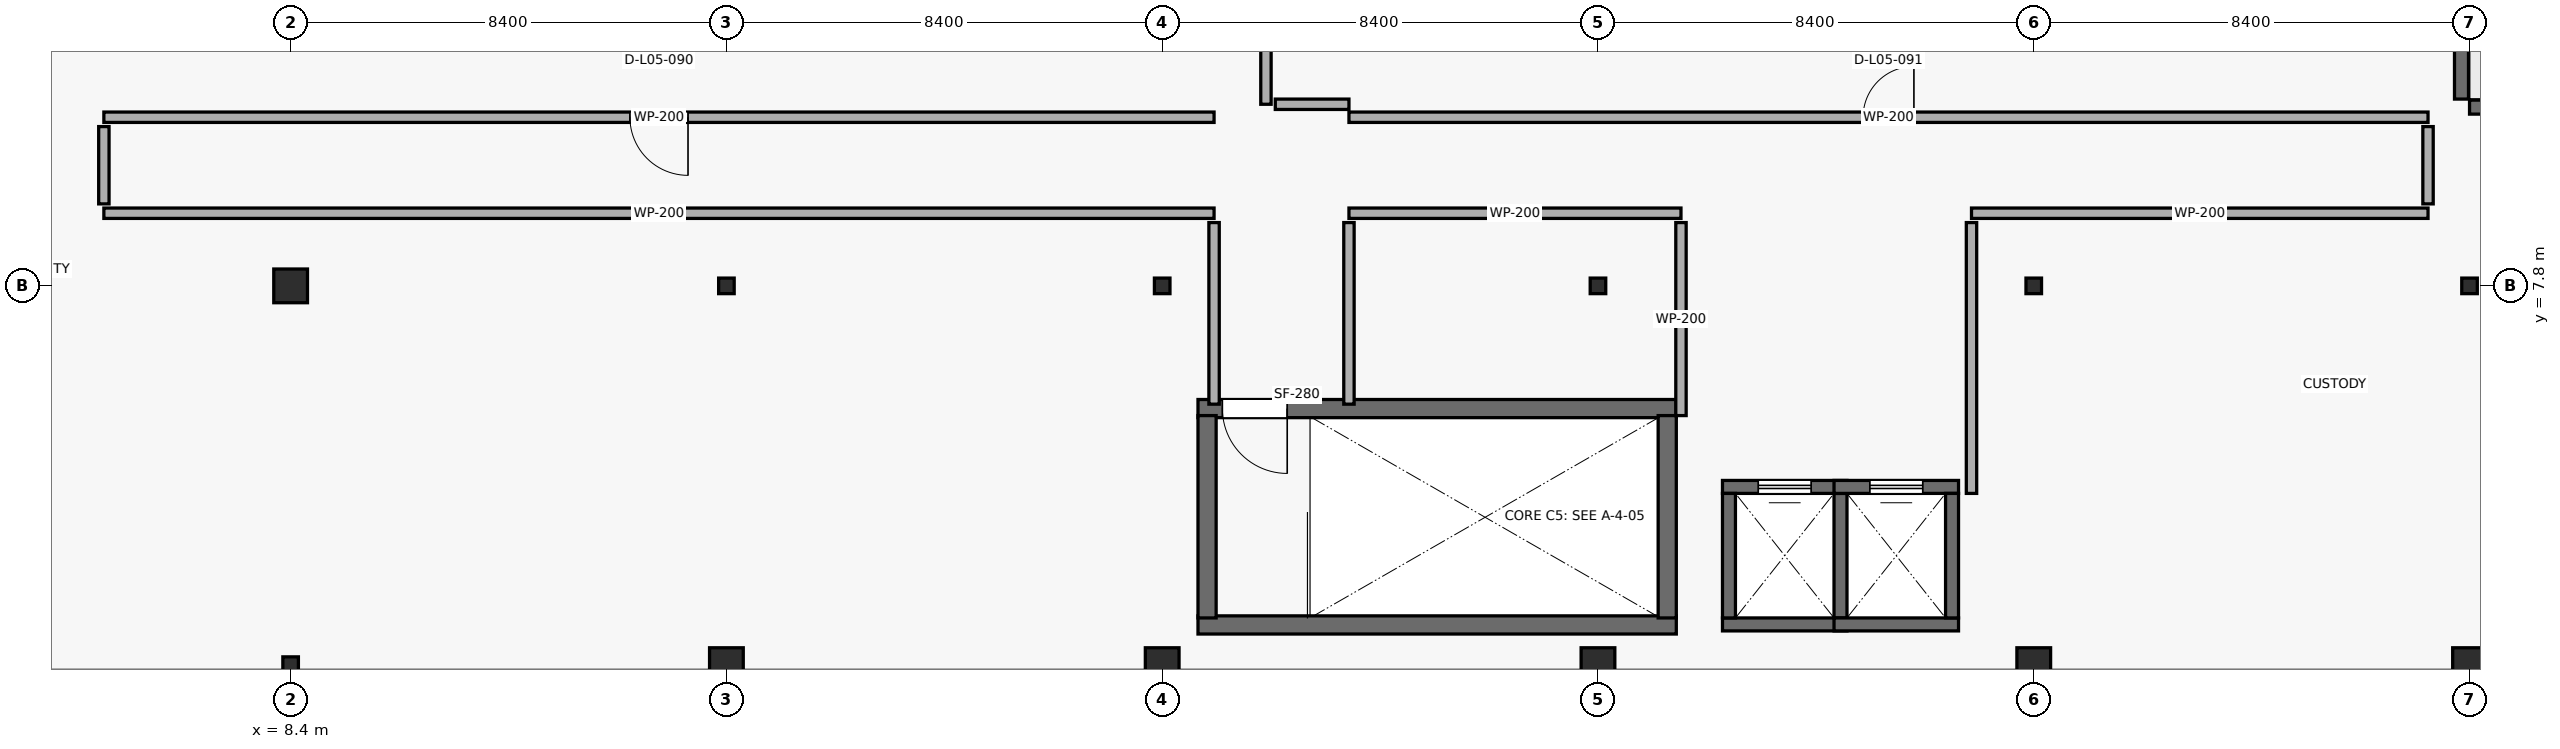
"""IFC4 building model, lengths in metres.
Left out: names, types, materials, properties, quantities, classifications, styles, units other than length and angle.
Written with IfcOpenShell. Run it as: python <this file> out.ifc"""

import sys

from ifc_helpers import new_model, si_unit, direction, frame, frame_2d, origin, origin_2d, place, context, subcontext, project, spatial, rectangle, hollow_rectangle, extrude, element, fill, save


model = new_model("IFC4")
c1 = context("Model", 3, precision=1e-05, world=origin(), true_north=direction((0.0, 1.0)))
c2 = subcontext(c1, "Body", "Model", "MODEL_VIEW")
j1 = project(units=[si_unit("LENGTHUNIT", "METRE"), si_unit("PLANEANGLEUNIT", "RADIAN")], contexts=[c1])
p1 = place(None, origin())
s1 = spatial("IfcSite", under=j1, at=p1, CompositionType="ELEMENT")
p2 = place(p1, origin())
s2 = spatial("IfcBuilding", under=s1, at=p2, CompositionType="ELEMENT")
p3 = place(p2, frame((0.0, 0.0, 20.4)))
s3 = spatial("IfcBuildingStorey", under=s2, at=p3, CompositionType="ELEMENT", Elevation=20.4)
p4 = place(p3, frame((8.4, 0.5, 0.0), z_axis=(0.0, 0.0, 1.0), x_axis=(1.0, 0.0, 0.0)))
e1 = element("IfcColumn", 1, at=p4, inside=s3, PredefinedType="COLUMN", context=c2, shape_type="SweptSolid", body=[
    extrude(hollow_rectangle(XDim=0.3, YDim=0.3, WallThickness=0.012, at=origin_2d()), origin(), (0.0, 0.0, 1.0), 5.1),
])
for number, where, z_axis, x_axis in (
    (2, (8.4, 7.8, 0.0), (0.0, 0.0, 1.0), (1.0, 0.0, 0.0)),
    (3, (16.8, 0.5, 0.0), (0.0, 0.0, 1.0), (1.0, 0.0, 0.0)),
):
    element("IfcColumn", number, at=place(p3, frame(where, z_axis=z_axis, x_axis=x_axis)), inside=s3, PredefinedType="COLUMN", context=c2, shape_type="SweptSolid", body=[
        extrude(rectangle(XDim=0.65, YDim=0.65, at=origin_2d()), origin(), (0.0, 0.0, 1.0), 5.1),
    ])
p5 = place(p3, frame((16.8, 7.8, 0.0), z_axis=(0.0, 0.0, 1.0), x_axis=(1.0, 0.0, 0.0)))
e4 = element("IfcColumn", 4, at=p5, inside=s3, PredefinedType="COLUMN", context=c2, shape_type="SweptSolid", body=[
    extrude(hollow_rectangle(XDim=0.3, YDim=0.3, WallThickness=0.012, at=origin_2d()), origin(), (0.0, 0.0, 1.0), 5.1),
])
p6 = place(p3, frame((25.2, 0.5, 0.0), z_axis=(0.0, 0.0, 1.0), x_axis=(1.0, 0.0, 0.0)))
e5 = element("IfcColumn", 5, at=p6, inside=s3, PredefinedType="COLUMN", context=c2, shape_type="SweptSolid", body=[
    extrude(rectangle(XDim=0.65, YDim=0.65, at=origin_2d()), origin(), (0.0, 0.0, 1.0), 5.1),
])
p7 = place(p3, frame((25.2, 7.8, 0.0), z_axis=(0.0, 0.0, 1.0), x_axis=(1.0, 0.0, 0.0)))
e6 = element("IfcColumn", 6, at=p7, inside=s3, PredefinedType="COLUMN", context=c2, shape_type="SweptSolid", body=[
    extrude(hollow_rectangle(XDim=0.3, YDim=0.3, WallThickness=0.012, at=origin_2d()), origin(), (0.0, 0.0, 1.0), 5.1),
])
p8 = place(p3, frame((33.6, 0.5, 0.0), z_axis=(0.0, 0.0, 1.0), x_axis=(1.0, 0.0, 0.0)))
e7 = element("IfcColumn", 7, at=p8, inside=s3, PredefinedType="COLUMN", context=c2, shape_type="SweptSolid", body=[
    extrude(rectangle(XDim=0.65, YDim=0.65, at=origin_2d()), origin(), (0.0, 0.0, 1.0), 5.1),
])
p9 = place(p3, frame((33.6, 7.8, 0.0), z_axis=(0.0, 0.0, 1.0), x_axis=(1.0, 0.0, 0.0)))
e8 = element("IfcColumn", 8, at=p9, inside=s3, PredefinedType="COLUMN", context=c2, shape_type="SweptSolid", body=[
    extrude(hollow_rectangle(XDim=0.3, YDim=0.3, WallThickness=0.012, at=origin_2d()), origin(), (0.0, 0.0, 1.0), 5.1),
])
p10 = place(p3, frame((42.0, 0.5, 0.0), z_axis=(0.0, 0.0, 1.0), x_axis=(1.0, 0.0, 0.0)))
e9 = element("IfcColumn", 9, at=p10, inside=s3, PredefinedType="COLUMN", context=c2, shape_type="SweptSolid", body=[
    extrude(rectangle(XDim=0.65, YDim=0.65, at=origin_2d()), origin(), (0.0, 0.0, 1.0), 5.1),
])
p11 = place(p3, frame((42.0, 7.8, 0.0), z_axis=(0.0, 0.0, 1.0), x_axis=(1.0, 0.0, 0.0)))
e10 = element("IfcColumn", 10, at=p11, inside=s3, PredefinedType="COLUMN", context=c2, shape_type="SweptSolid", body=[
    extrude(hollow_rectangle(XDim=0.3, YDim=0.3, WallThickness=0.012, at=origin_2d()), origin(), (0.0, 0.0, 1.0), 5.1),
])
p12 = place(p3, frame((50.4, 0.5, 0.0), z_axis=(0.0, 0.0, 1.0), x_axis=(1.0, 0.0, 0.0)))
e11 = element("IfcColumn", 11, at=p12, inside=s3, PredefinedType="COLUMN", context=c2, shape_type="SweptSolid", body=[
    extrude(rectangle(XDim=0.65, YDim=0.65, at=origin_2d()), origin(), (0.0, 0.0, 1.0), 5.1),
])
p13 = place(p3, frame((50.4, 7.8, 0.0), z_axis=(0.0, 0.0, 1.0), x_axis=(1.0, 0.0, 0.0)))
e12 = element("IfcColumn", 12, at=p13, inside=s3, PredefinedType="COLUMN", context=c2, shape_type="SweptSolid", body=[
    extrude(hollow_rectangle(XDim=0.3, YDim=0.3, WallThickness=0.012, at=origin_2d()), origin(), (0.0, 0.0, 1.0), 5.1),
])
p14 = place(p3, frame((50.245, 15.6, 0.0), z_axis=(0.0, 0.0, 1.0), x_axis=(0.0, -1.0, 0.0)))
e13 = element("IfcWall", 13, at=p14, inside=s3, PredefinedType="SOLIDWALL", context=c2, shape_type="SweptSolid", body=[
    extrude(rectangle(XDim=4.2, YDim=0.27, at=frame_2d((2.1, 0.0))), origin(), (0.0, 0.0, 1.0), 4.88),
])
p15 = place(p3, frame((50.4, 11.245, 0.0), z_axis=(0.0, 0.0, 1.0), x_axis=(1.0, 0.0, 0.0)))
e14 = element("IfcWall", 14, at=p15, inside=s3, PredefinedType="SOLIDWALL", context=c2, shape_type="SweptSolid", body=[
    extrude(rectangle(XDim=8.4, YDim=0.27, at=frame_2d((4.2, 0.0))), origin(), (0.0, 0.0, 1.0), 4.88),
])
p16 = place(p15, frame((2.8, 0.0, 1.85)))
e15 = element("IfcOpeningElement", 15, at=p16, cuts=e14, PredefinedType="OPENING", context=c2, shape_type="SweptSolid", body=[
    extrude(rectangle(XDim=0.45, YDim=1.1, at=frame_2d((0.225, 0.55))), frame((0.0, 0.145, 0.0), z_axis=(0.0, -1.0, 0.0), x_axis=(1.0, 0.0, 0.0)), (0.0, 0.0, 1.0), 0.29),
])
p17 = place(p3, frame((25.89, 1.265, 0.0), z_axis=(0.0, 0.0, 1.0), x_axis=(1.0, 0.0, 0.0)))
e16 = element("IfcWall", 16, at=p17, inside=s3, PredefinedType="SHEAR", context=c2, shape_type="SweptSolid", body=[
    extrude(rectangle(XDim=9.22, YDim=0.35, at=frame_2d((4.61, 0.0))), origin(), (0.0, 0.0, 1.0), 4.84),
])
p18 = place(p3, frame((35.11, 5.435, 0.0), z_axis=(0.0, 0.0, 1.0), x_axis=(-1.0, 0.0, 0.0)))
e17 = element("IfcWall", 17, at=p18, inside=s3, PredefinedType="SHEAR", context=c2, shape_type="SweptSolid", body=[
    extrude(rectangle(XDim=9.22, YDim=0.35, at=frame_2d((4.61, 0.0))), origin(), (0.0, 0.0, 1.0), 4.84),
])
p19 = place(p18, frame((7.5, 0.0, 0.0)))
e18 = element("IfcOpeningElement", 18, at=p19, cuts=e17, PredefinedType="OPENING", context=c2, shape_type="SweptSolid", body=[
    extrude(rectangle(XDim=1.25, YDim=2.2, at=frame_2d((0.625, 1.1))), frame((0.0, 0.185, 0.0), z_axis=(0.0, -1.0, 0.0), x_axis=(1.0, 0.0, 0.0)), (0.0, 0.0, 1.0), 0.37),
])
for number, where, z_axis, x_axis in (
    (19, (26.065, 1.4, 0.0), (0.0, 0.0, 1.0), (0.0, 1.0, 0.0)),
    (20, (34.935, 5.3, 0.0), (0.0, 0.0, 1.0), (0.0, -1.0, 0.0)),
):
    element("IfcWall", number, at=place(p3, frame(where, z_axis=z_axis, x_axis=x_axis)), inside=s3, PredefinedType="SHEAR", context=c2, shape_type="SweptSolid", body=[
        extrude(rectangle(XDim=3.9, YDim=0.35, at=frame_2d((1.95, 0.0))), origin(), (0.0, 0.0, 1.0), 4.84),
    ])
p20 = place(p3, frame((36.0, 1.275, 0.0), z_axis=(0.0, 0.0, 1.0), x_axis=(1.0, 0.0, 0.0)))
e21 = element("IfcWall", 21, at=p20, inside=s3, PredefinedType="SHEAR", context=c2, shape_type="SweptSolid", body=[
    extrude(rectangle(XDim=2.4, YDim=0.25, at=frame_2d((1.2, 0.0))), origin(), (0.0, 0.0, 1.0), 4.84),
])
p21 = place(p3, frame((38.4, 3.925, 0.0), z_axis=(0.0, 0.0, 1.0), x_axis=(-1.0, 0.0, 0.0)))
e22 = element("IfcWall", 22, at=p21, inside=s3, PredefinedType="SHEAR", context=c2, shape_type="SweptSolid", body=[
    extrude(rectangle(XDim=2.4, YDim=0.25, at=frame_2d((1.2, 0.0))), origin(), (0.0, 0.0, 1.0), 4.84),
])
p22 = place(p21, frame((0.69, 0.0, 0.0)))
e23 = element("IfcOpeningElement", 23, at=p22, cuts=e22, PredefinedType="OPENING", context=c2, shape_type="SweptSolid", body=[
    extrude(rectangle(XDim=1.02, YDim=2.15, at=frame_2d((0.51, 1.075))), frame((0.0, 0.135, 0.0), z_axis=(0.0, -1.0, 0.0), x_axis=(1.0, 0.0, 0.0)), (0.0, 0.0, 1.0), 0.27),
])
for number, where, z_axis, x_axis in (
    (24, (36.125, 1.4, 0.0), (0.0, 0.0, 1.0), (0.0, 1.0, 0.0)),
    (25, (38.275, 3.8, 0.0), (0.0, 0.0, 1.0), (0.0, -1.0, 0.0)),
    (26, (38.15, 1.275, 0.0), (0.0, 0.0, 1.0), (1.0, 0.0, 0.0)),
):
    element("IfcWall", number, at=place(p3, frame(where, z_axis=z_axis, x_axis=x_axis)), inside=s3, PredefinedType="SHEAR", context=c2, shape_type="SweptSolid", body=[
        extrude(rectangle(XDim=2.4, YDim=0.25, at=frame_2d((1.2, 0.0))), origin(), (0.0, 0.0, 1.0), 4.84),
    ])
p23 = place(p3, frame((40.55, 3.925, 0.0), z_axis=(0.0, 0.0, 1.0), x_axis=(-1.0, 0.0, 0.0)))
e27 = element("IfcWall", 27, at=p23, inside=s3, PredefinedType="SHEAR", context=c2, shape_type="SweptSolid", body=[
    extrude(rectangle(XDim=2.4, YDim=0.25, at=frame_2d((1.2, 0.0))), origin(), (0.0, 0.0, 1.0), 4.84),
])
p24 = place(p23, frame((0.69, 0.0, 0.0)))
e28 = element("IfcOpeningElement", 28, at=p24, cuts=e27, PredefinedType="OPENING", context=c2, shape_type="SweptSolid", body=[
    extrude(rectangle(XDim=1.02, YDim=2.15, at=frame_2d((0.51, 1.075))), frame((0.0, 0.135, 0.0), z_axis=(0.0, -1.0, 0.0), x_axis=(1.0, 0.0, 0.0)), (0.0, 0.0, 1.0), 0.27),
])
p25 = place(p3, frame((40.425, 3.8, 0.0), z_axis=(0.0, 0.0, 1.0), x_axis=(0.0, -1.0, 0.0)))
e29 = element("IfcWall", 29, at=p25, inside=s3, PredefinedType="SHEAR", context=c2, shape_type="SweptSolid", body=[
    extrude(rectangle(XDim=2.4, YDim=0.25, at=frame_2d((1.2, 0.0))), origin(), (0.0, 0.0, 1.0), 4.84),
])
p26 = place(p3, frame((26.2, 11.05, 0.0), z_axis=(0.0, 0.0, 1.0), x_axis=(-1.0, 0.0, 0.0)))
e30 = element("IfcWall", 30, at=p26, inside=s3, PredefinedType="PARTITIONING", context=c2, shape_type="SweptSolid", body=[
    extrude(rectangle(XDim=21.4, YDim=0.2, at=frame_2d((10.7, 0.0))), origin(), (0.0, 0.0, 1.0), 4.84),
])
p27 = place(p26, frame((10.14, 0.0, 0.0)))
e31 = element("IfcOpeningElement", 31, at=p27, cuts=e30, PredefinedType="OPENING", context=c2, shape_type="SweptSolid", body=[
    extrude(rectangle(XDim=1.12, YDim=2.15, at=frame_2d((0.56, 1.075))), frame((0.0, 0.11, 0.0), z_axis=(0.0, -1.0, 0.0), x_axis=(1.0, 0.0, 0.0)), (0.0, 0.0, 1.0), 0.22),
])
p28 = place(p3, frame((4.8, 9.2, 0.0), z_axis=(0.0, 0.0, 1.0), x_axis=(1.0, 0.0, 0.0)))
e32 = element("IfcWall", 32, at=p28, inside=s3, PredefinedType="PARTITIONING", context=c2, shape_type="SweptSolid", body=[
    extrude(rectangle(XDim=21.4, YDim=0.2, at=frame_2d((10.7, 0.0))), origin(), (0.0, 0.0, 1.0), 4.84),
])
p29 = place(p3, frame((49.6, 11.05, 0.0), z_axis=(0.0, 0.0, 1.0), x_axis=(-1.0, 0.0, 0.0)))
e33 = element("IfcWall", 33, at=p29, inside=s3, PredefinedType="PARTITIONING", context=c2, shape_type="SweptSolid", body=[
    extrude(rectangle(XDim=20.8, YDim=0.2, at=frame_2d((10.4, 0.0))), origin(), (0.0, 0.0, 1.0), 4.84),
])
p30 = place(p29, frame((9.91, 0.0, 0.0)))
e34 = element("IfcOpeningElement", 34, at=p30, cuts=e33, PredefinedType="OPENING", context=c2, shape_type="SweptSolid", body=[
    extrude(rectangle(XDim=0.98, YDim=2.12, at=frame_2d((0.49, 1.06))), frame((0.0, 0.11, 0.0), z_axis=(0.0, -1.0, 0.0), x_axis=(1.0, 0.0, 0.0)), (0.0, 0.0, 1.0), 0.22),
])
p31 = place(p3, frame((40.8, 9.2, 0.0), z_axis=(0.0, 0.0, 1.0), x_axis=(1.0, 0.0, 0.0)))
e35 = element("IfcWall", 35, at=p31, inside=s3, PredefinedType="PARTITIONING", context=c2, shape_type="SweptSolid", body=[
    extrude(rectangle(XDim=8.8, YDim=0.2, at=frame_2d((4.4, 0.0))), origin(), (0.0, 0.0, 1.0), 4.84),
])
p32 = place(p3, frame((28.8, 9.2, 0.0), z_axis=(0.0, 0.0, 1.0), x_axis=(1.0, 0.0, 0.0)))
e36 = element("IfcWall", 36, at=p32, inside=s3, PredefinedType="PARTITIONING", context=c2, shape_type="SweptSolid", body=[
    extrude(rectangle(XDim=6.4, YDim=0.2, at=frame_2d((3.2, 0.0))), origin(), (0.0, 0.0, 1.0), 4.84),
])
p33 = place(p3, frame((35.2, 9.02, 0.0), z_axis=(0.0, 0.0, 1.0), x_axis=(0.0, -1.0, 0.0)))
e37 = element("IfcWall", 37, at=p33, inside=s3, PredefinedType="PARTITIONING", context=c2, shape_type="SweptSolid", body=[
    extrude(rectangle(XDim=3.72, YDim=0.2, at=frame_2d((1.86, 0.0))), origin(), (0.0, 0.0, 1.0), 4.84),
])
p34 = place(p3, frame((40.8, 3.8, 0.0), z_axis=(0.0, 0.0, 1.0), x_axis=(0.0, 1.0, 0.0)))
e38 = element("IfcWall", 38, at=p34, inside=s3, PredefinedType="PARTITIONING", context=c2, shape_type="SweptSolid", body=[
    extrude(rectangle(XDim=5.22, YDim=0.2, at=frame_2d((2.61, 0.0))), origin(), (0.0, 0.0, 1.0), 4.84),
])
p35 = place(p3, frame((27.2, 15.54, 0.0), z_axis=(0.0, 0.0, 1.0), x_axis=(0.0, -1.0, 0.0)))
e39 = element("IfcWall", 39, at=p35, inside=s3, PredefinedType="PARTITIONING", context=c2, shape_type="SweptSolid", body=[
    extrude(rectangle(XDim=4.24, YDim=0.2, at=frame_2d((2.12, 0.0))), origin(), (0.0, 0.0, 1.0), 4.84),
])
for number, where, z_axis, x_axis in (
    (40, (26.2, 9.02, 0.0), (0.0, 0.0, 1.0), (0.0, -1.0, 0.0)),
    (41, (28.8, 5.52, 0.0), (0.0, 0.0, 1.0), (0.0, 1.0, 0.0)),
):
    element("IfcWall", number, at=place(p3, frame(where, z_axis=z_axis, x_axis=x_axis)), inside=s3, PredefinedType="PARTITIONING", context=c2, shape_type="SweptSolid", body=[
        extrude(rectangle(XDim=3.5, YDim=0.2, at=frame_2d((1.75, 0.0))), origin(), (0.0, 0.0, 1.0), 4.84),
    ])
for number, where, z_axis, x_axis in (
    (42, (4.8, 10.87, 0.0), (0.0, 0.0, 1.0), (0.0, -1.0, 0.0)),
    (43, (49.6, 9.38, 0.0), (0.0, 0.0, 1.0), (0.0, 1.0, 0.0)),
):
    element("IfcWall", number, at=place(p3, frame(where, z_axis=z_axis, x_axis=x_axis)), inside=s3, PredefinedType="PARTITIONING", context=c2, shape_type="SweptSolid", body=[
        extrude(rectangle(XDim=1.49, YDim=0.2, at=frame_2d((0.745, 0.0))), origin(), (0.0, 0.0, 1.0), 4.84),
    ])
p36 = place(p3, frame((28.8, 11.3, 0.0), z_axis=(0.0, 0.0, 1.0), x_axis=(-1.0, 0.0, 0.0)))
e44 = element("IfcWall", 44, at=p36, inside=s3, PredefinedType="PARTITIONING", context=c2, shape_type="SweptSolid", body=[
    extrude(rectangle(XDim=1.42, YDim=0.2, at=frame_2d((0.71, 0.0))), origin(), (0.0, 0.0, 1.0), 4.84),
])
p37 = place(p19, origin())
e45 = element("IfcDoor", 45, at=p37, inside=s3, OperationType="SINGLE_SWING_LEFT", PredefinedType="DOOR", context=c2, shape_type="SweptSolid", body=[
    extrude(rectangle(XDim=1.25, YDim=2.2, at=frame_2d((0.625, 1.1))), frame((0.0, 0.025, 0.0), z_axis=(0.0, -1.0, 0.0), x_axis=(1.0, 0.0, 0.0)), (0.0, 0.0, 1.0), 0.05),
])
fill(e18, e45)
p38 = place(p22, origin())
e46 = element("IfcDoor", 46, at=p38, inside=s3, OperationType="SLIDING_TO_RIGHT", PredefinedType="DOOR", context=c2, shape_type="SweptSolid", body=[
    extrude(rectangle(XDim=1.02, YDim=2.15, at=frame_2d((0.51, 1.075))), frame((0.0, 0.025, 0.0), z_axis=(0.0, -1.0, 0.0), x_axis=(1.0, 0.0, 0.0)), (0.0, 0.0, 1.0), 0.05),
])
fill(e23, e46)
p39 = place(p24, origin())
e47 = element("IfcDoor", 47, at=p39, inside=s3, OperationType="SLIDING_TO_RIGHT", PredefinedType="DOOR", context=c2, shape_type="SweptSolid", body=[
    extrude(rectangle(XDim=1.02, YDim=2.15, at=frame_2d((0.51, 1.075))), frame((0.0, 0.025, 0.0), z_axis=(0.0, -1.0, 0.0), x_axis=(1.0, 0.0, 0.0)), (0.0, 0.0, 1.0), 0.05),
])
fill(e28, e47)
p40 = place(p27, origin())
e48 = element("IfcDoor", 48, at=p40, inside=s3, OperationType="SINGLE_SWING_LEFT", PredefinedType="DOOR", context=c2, shape_type="SweptSolid", body=[
    extrude(rectangle(XDim=1.12, YDim=2.15, at=frame_2d((0.56, 1.075))), frame((0.0, 0.025, 0.0), z_axis=(0.0, -1.0, 0.0), x_axis=(1.0, 0.0, 0.0)), (0.0, 0.0, 1.0), 0.05),
])
fill(e31, e48)
p41 = place(p30, origin())
e49 = element("IfcDoor", 49, at=p41, inside=s3, OperationType="SINGLE_SWING_RIGHT", PredefinedType="DOOR", context=c2, shape_type="SweptSolid", body=[
    extrude(rectangle(XDim=0.98, YDim=2.12, at=frame_2d((0.49, 1.06))), frame((0.0, 0.025, 0.0), z_axis=(0.0, -1.0, 0.0), x_axis=(1.0, 0.0, 0.0)), (0.0, 0.0, 1.0), 0.05),
])
fill(e34, e49)
save(model, sys.argv[1])
